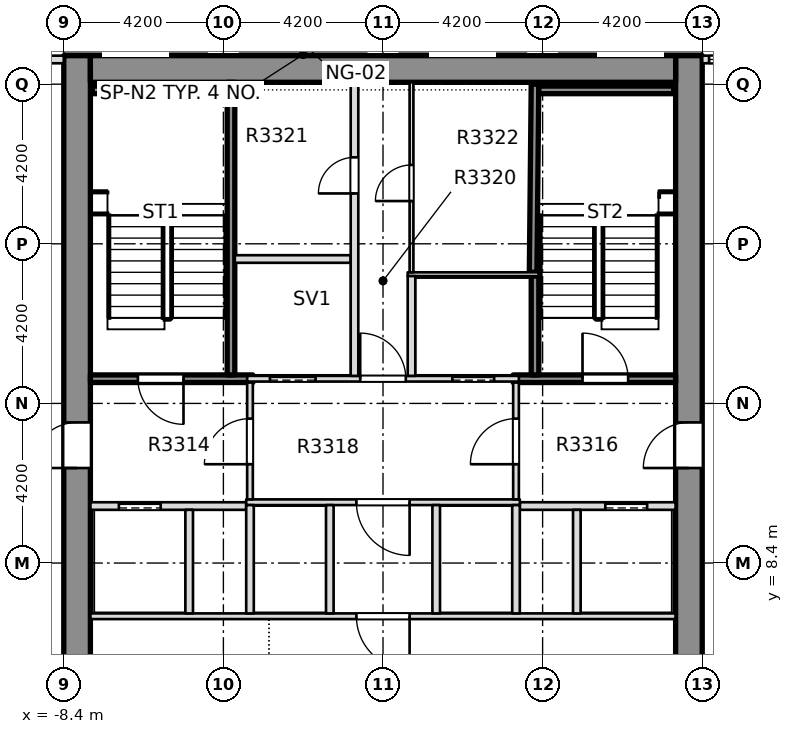
"""IFC4 building model, lengths in metres.
Left out: names, types, materials, properties, quantities, classifications, styles, units other than length and angle.
Written with IfcOpenShell. Run it as: python <this file> out.ifc"""

import sys

from ifc_helpers import new_model, si_unit, direction, frame, frame_2d, origin, place, context, subcontext, project, spatial, rectangle, extrude, element, fill, save


model = new_model("IFC4")
c1 = context("Model", 3, precision=1e-05, world=origin(), true_north=direction((0.0, 1.0)))
c2 = subcontext(c1, "Body", "Model", "MODEL_VIEW")
j1 = project(units=[si_unit("LENGTHUNIT", "METRE"), si_unit("PLANEANGLEUNIT", "RADIAN")], contexts=[c1])
p1 = place(None, origin())
s1 = spatial("IfcSite", under=j1, at=p1, CompositionType="ELEMENT")
p2 = place(p1, origin())
s2 = spatial("IfcBuilding", under=s1, at=p2, CompositionType="ELEMENT")
p3 = place(p2, frame((0.0, 0.0, 133.1)))
s3 = spatial("IfcBuildingStorey", under=s2, at=p3, CompositionType="ELEMENT", Elevation=133.1)
p4 = place(p3, frame((8.05, -8.4, -0.4), z_axis=(0.0, 0.0, 1.0), x_axis=(0.0, 1.0, 0.0)))
e1 = element("IfcWall", 1, at=p4, inside=s3, PredefinedType="SOLIDWALL", context=c2, shape_type="SweptSolid", body=[
    extrude(rectangle(XDim=30.15, YDim=0.7, at=frame_2d((15.075, 0.0))), origin(), (0.0, 0.0, 1.0), 3.45),
])
p5 = place(p4, frame((19.3, 0.0, 0.4)))
e2 = element("IfcOpeningElement", 2, at=p5, cuts=e1, PredefinedType="OPENING", context=c2, shape_type="SweptSolid", body=[
    extrude(rectangle(XDim=1.2, YDim=2.1, at=frame_2d((0.6, 1.05))), frame((0.0, 0.36, 0.0), z_axis=(0.0, -1.0, 0.0), x_axis=(1.0, 0.0, 0.0)), (0.0, 0.0, 1.0), 0.72),
])
p6 = place(p3, frame((-8.05, -8.4, -0.4), z_axis=(0.0, 0.0, 1.0), x_axis=(0.0, 1.0, 0.0)))
e3 = element("IfcWall", 3, at=p6, inside=s3, PredefinedType="SOLIDWALL", context=c2, shape_type="SweptSolid", body=[
    extrude(rectangle(XDim=30.15, YDim=0.7, at=frame_2d((15.075, 0.0))), origin(), (0.0, 0.0, 1.0), 3.45),
])
p7 = place(p6, frame((19.3, 0.0, 0.4)))
e4 = element("IfcOpeningElement", 4, at=p7, cuts=e3, PredefinedType="OPENING", context=c2, shape_type="SweptSolid", body=[
    extrude(rectangle(XDim=1.2, YDim=2.1, at=frame_2d((0.6, 1.05))), frame((0.0, 0.36, 0.0), z_axis=(0.0, -1.0, 0.0), x_axis=(1.0, 0.0, 0.0)), (0.0, 0.0, 1.0), 0.72),
])
p8 = place(p3, frame((-7.7, 21.4, -0.4), z_axis=(0.0, 0.0, 1.0), x_axis=(1.0, 0.0, 0.0)))
e5 = element("IfcWall", 5, at=p8, inside=s3, PredefinedType="SHEAR", context=c2, shape_type="SweptSolid", body=[
    extrude(rectangle(XDim=15.4, YDim=0.7, at=frame_2d((7.7, 0.0))), origin(), (0.0, 0.0, 1.0), 3.45),
])
p9 = place(p3, frame((12.05, 21.65, 0.0), z_axis=(0.0, 0.0, 1.0), x_axis=(-1.0, 0.0, 0.0)))
e6 = element("IfcWall", 6, at=p9, inside=s3, PredefinedType="STANDARD", context=c2, shape_type="SweptSolid", body=[
    extrude(rectangle(XDim=3.65, YDim=0.2, at=frame_2d((1.825, 0.0))), origin(), (0.0, 0.0, 1.0), 3.05),
])
p10 = place(p9, frame((1.67, 0.0, 0.2)))
e7 = element("IfcOpeningElement", 7, at=p10, cuts=e6, PredefinedType="OPENING", context=c2, shape_type="SweptSolid", body=[
    extrude(rectangle(XDim=1.8, YDim=2.65, at=frame_2d((0.9, 1.325))), frame((0.0, 0.11, 0.0), z_axis=(0.0, -1.0, 0.0), x_axis=(1.0, 0.0, 0.0)), (0.0, 0.0, 1.0), 0.22),
])
p11 = place(p3, frame((-8.4, 21.65, 0.0), z_axis=(0.0, 0.0, 1.0), x_axis=(-1.0, 0.0, 0.0)))
e8 = element("IfcWall", 8, at=p11, inside=s3, PredefinedType="STANDARD", context=c2, shape_type="SweptSolid", body=[
    extrude(rectangle(XDim=3.65, YDim=0.2, at=frame_2d((1.825, 0.0))), origin(), (0.0, 0.0, 1.0), 3.05),
])
p12 = place(p11, frame((0.375, 0.0, 0.2)))
e9 = element("IfcOpeningElement", 9, at=p12, cuts=e8, PredefinedType="OPENING", context=c2, shape_type="SweptSolid", body=[
    extrude(rectangle(XDim=1.8, YDim=2.65, at=frame_2d((0.9, 1.325))), frame((0.0, 0.11, 0.0), z_axis=(0.0, -1.0, 0.0), x_axis=(1.0, 0.0, 0.0)), (0.0, 0.0, 1.0), 0.22),
])
p13 = place(p3, frame((-7.699, 7.0, 0.0), z_axis=(0.0, 0.0, 1.0), x_axis=(1.0, 0.0, 0.0)))
e10 = element("IfcWall", 10, at=p13, inside=s3, PredefinedType="PARTITIONING", context=c2, shape_type="SweptSolid", body=[
    extrude(rectangle(XDim=15.398, YDim=0.15, at=frame_2d((7.699, 0.0))), origin(), (0.0, 0.0, 1.0), 3.05),
])
p14 = place(p13, frame((6.999, 0.0, 0.0)))
e11 = element("IfcOpeningElement", 11, at=p14, cuts=e10, PredefinedType="OPENING", context=c2, shape_type="SweptSolid", body=[
    extrude(rectangle(XDim=1.4, YDim=2.1, at=frame_2d((0.7, 1.05))), frame((0.0, 0.085, 0.0), z_axis=(0.0, -1.0, 0.0), x_axis=(1.0, 0.0, 0.0)), (0.0, 0.0, 1.0), 0.17),
])
p15 = place(p3, frame((-7.699, 9.9, 0.0), z_axis=(0.0, 0.0, 1.0), x_axis=(1.0, 0.0, 0.0)))
e12 = element("IfcWall", 12, at=p15, inside=s3, PredefinedType="PARTITIONING", context=c2, shape_type="SweptSolid", body=[
    extrude(rectangle(XDim=4.099, YDim=0.2, at=frame_2d((2.049, 0.0))), origin(), (0.0, 0.0, 1.0), 3.05),
])
p16 = place(p15, frame((0.749, 0.0, 0.0)))
e13 = element("IfcOpeningElement", 13, at=p16, cuts=e12, PredefinedType="OPENING", context=c2, shape_type="SweptSolid", body=[
    extrude(rectangle(XDim=1.1, YDim=2.1, at=frame_2d((0.55, 1.05))), frame((0.0, 0.11, 0.0), z_axis=(0.0, -1.0, 0.0), x_axis=(1.0, 0.0, 0.0)), (0.0, 0.0, 1.0), 0.22),
])
p17 = place(p3, frame((3.6, 9.9, 0.0), z_axis=(0.0, 0.0, 1.0), x_axis=(1.0, 0.0, 0.0)))
e14 = element("IfcWall", 14, at=p17, inside=s3, PredefinedType="PARTITIONING", context=c2, shape_type="SweptSolid", body=[
    extrude(rectangle(XDim=4.099, YDim=0.2, at=frame_2d((2.049, 0.0))), origin(), (0.0, 0.0, 1.0), 3.05),
])
p18 = place(p17, frame((2.25, 0.0, 0.0)))
e15 = element("IfcOpeningElement", 15, at=p18, cuts=e14, PredefinedType="OPENING", context=c2, shape_type="SweptSolid", body=[
    extrude(rectangle(XDim=1.1, YDim=2.1, at=frame_2d((0.55, 1.05))), frame((0.0, 0.11, 0.0), z_axis=(0.0, -1.0, 0.0), x_axis=(1.0, 0.0, 0.0)), (0.0, 0.0, 1.0), 0.22),
])
p19 = place(p3, frame((-3.6, 10.0, 0.0), z_axis=(0.0, 0.0, 1.0), x_axis=(1.0, 0.0, 0.0)))
e16 = element("IfcWall", 16, at=p19, inside=s3, PredefinedType="PARTITIONING", context=c2, shape_type="SweptSolid", body=[
    extrude(rectangle(XDim=7.2, YDim=0.15, at=frame_2d((3.6, 0.0))), origin(), (0.0, 0.0, 1.0), 3.05),
])
p20 = place(p19, frame((2.9, 0.0, 0.0)))
e17 = element("IfcOpeningElement", 17, at=p20, cuts=e16, PredefinedType="OPENING", context=c2, shape_type="SweptSolid", body=[
    extrude(rectangle(XDim=1.4, YDim=2.1, at=frame_2d((0.7, 1.05))), frame((0.0, 0.085, 0.0), z_axis=(0.0, -1.0, 0.0), x_axis=(1.0, 0.0, 0.0)), (0.0, 0.0, 1.0), 0.17),
])
p21 = place(p3, frame((-7.699, 13.25, 0.0), z_axis=(0.0, 0.0, 1.0), x_axis=(1.0, 0.0, 0.0)))
e18 = element("IfcWall", 18, at=p21, inside=s3, PredefinedType="SOLIDWALL", context=c2, shape_type="SweptSolid", body=[
    extrude(rectangle(XDim=4.274, YDim=0.2, at=frame_2d((2.137, 0.0))), origin(), (0.0, 0.0, 1.0), 3.05),
])
p22 = place(p21, frame((1.249, 0.0, 0.0)))
e19 = element("IfcOpeningElement", 19, at=p22, cuts=e18, PredefinedType="OPENING", context=c2, shape_type="SweptSolid", body=[
    extrude(rectangle(XDim=1.2, YDim=2.1, at=frame_2d((0.6, 1.05))), frame((0.0, 0.11, 0.0), z_axis=(0.0, -1.0, 0.0), x_axis=(1.0, 0.0, 0.0)), (0.0, 0.0, 1.0), 0.22),
])
p23 = place(p3, frame((-3.575, 13.25, 0.0), z_axis=(0.0, 0.0, 1.0), x_axis=(1.0, 0.0, 0.0)))
e20 = element("IfcWall", 20, at=p23, inside=s3, PredefinedType="PARTITIONING", context=c2, shape_type="SweptSolid", body=[
    extrude(rectangle(XDim=7.15, YDim=0.15, at=frame_2d((3.575, 0.0))), origin(), (0.0, 0.0, 1.0), 3.05),
])
p24 = place(p23, frame((0.6, 0.0, 0.0)))
e21 = element("IfcOpeningElement", 21, at=p24, cuts=e20, PredefinedType="OPENING", context=c2, shape_type="SweptSolid", body=[
    extrude(rectangle(XDim=1.2, YDim=2.1, at=frame_2d((0.6, 1.05))), frame((0.0, 0.085, 0.0), z_axis=(0.0, -1.0, 0.0), x_axis=(1.0, 0.0, 0.0)), (0.0, 0.0, 1.0), 0.17),
])
p25 = place(p23, frame((5.4, 0.0, 0.0)))
e22 = element("IfcOpeningElement", 22, at=p25, cuts=e20, PredefinedType="OPENING", context=c2, shape_type="SweptSolid", body=[
    extrude(rectangle(XDim=1.1, YDim=2.1, at=frame_2d((0.55, 1.05))), frame((0.0, 0.085, 0.0), z_axis=(0.0, -1.0, 0.0), x_axis=(1.0, 0.0, 0.0)), (0.0, 0.0, 1.0), 0.17),
])
p26 = place(p23, frame((2.975, 0.0, 0.0)))
e23 = element("IfcOpeningElement", 23, at=p26, cuts=e20, PredefinedType="OPENING", context=c2, shape_type="SweptSolid", body=[
    extrude(rectangle(XDim=1.2, YDim=2.1, at=frame_2d((0.6, 1.05))), frame((0.0, 0.085, 0.0), z_axis=(0.0, -1.0, 0.0), x_axis=(1.0, 0.0, 0.0)), (0.0, 0.0, 1.0), 0.17),
])
p27 = place(p3, frame((3.425, 13.25, 0.0), z_axis=(0.0, 0.0, 1.0), x_axis=(1.0, 0.0, 0.0)))
e24 = element("IfcWall", 24, at=p27, inside=s3, PredefinedType="SOLIDWALL", context=c2, shape_type="SweptSolid", body=[
    extrude(rectangle(XDim=4.274, YDim=0.2, at=frame_2d((2.137, 0.0))), origin(), (0.0, 0.0, 1.0), 3.05),
])
p28 = place(p27, frame((1.825, 0.0, 0.0)))
e25 = element("IfcOpeningElement", 25, at=p28, cuts=e24, PredefinedType="OPENING", context=c2, shape_type="SweptSolid", body=[
    extrude(rectangle(XDim=1.2, YDim=2.1, at=frame_2d((0.6, 1.05))), frame((0.0, 0.11, 0.0), z_axis=(0.0, -1.0, 0.0), x_axis=(1.0, 0.0, 0.0)), (0.0, 0.0, 1.0), 0.22),
])
p29 = place(p3, frame((0.65, 16.0, 0.0), z_axis=(0.0, 0.0, 1.0), x_axis=(1.0, 0.0, 0.0)))
e26 = element("IfcWall", 26, at=p29, inside=s3, PredefinedType="PARTITIONING", context=c2, shape_type="SweptSolid", body=[
    extrude(rectangle(XDim=3.45, YDim=0.1, at=frame_2d((1.725, 0.0))), origin(), (0.0, 0.0, 1.0), 3.05),
])
p30 = place(p3, frame((-3.9, 16.4, 0.0), z_axis=(0.0, 0.0, 1.0), x_axis=(1.0, 0.0, 0.0)))
e27 = element("IfcWall", 27, at=p30, inside=s3, PredefinedType="PARTITIONING", context=c2, shape_type="SweptSolid", body=[
    extrude(rectangle(XDim=3.05, YDim=0.2, at=frame_2d((1.525, 0.0))), origin(), (0.0, 0.0, 1.0), 3.05),
])
p31 = place(p3, frame((-5.1, 7.075, 0.0), z_axis=(0.0, 0.0, 1.0), x_axis=(0.0, 1.0, 0.0)))
e28 = element("IfcWall", 28, at=p31, inside=s3, PredefinedType="PARTITIONING", context=c2, shape_type="SweptSolid", body=[
    extrude(rectangle(XDim=2.725, YDim=0.2, at=frame_2d((1.363, 0.0))), origin(), (0.0, 0.0, 1.0), 3.05),
])
p32 = place(p3, frame((-4.0, 13.35, 0.0), z_axis=(0.0, 0.0, 1.0), x_axis=(0.0, 1.0, 0.0)))
e29 = element("IfcWall", 29, at=p32, inside=s3, PredefinedType="SOLIDWALL", context=c2, shape_type="SweptSolid", body=[
    extrude(rectangle(XDim=7.699, YDim=0.2, at=frame_2d((3.85, 0.0))), origin(), (0.0, 0.0, 1.0), 3.05),
])
p33 = place(p3, frame((-3.5, 7.075, 0.0), z_axis=(0.0, 0.0, 1.0), x_axis=(0.0, 1.0, 0.0)))
e30 = element("IfcWall", 30, at=p33, inside=s3, PredefinedType="PARTITIONING", context=c2, shape_type="SweptSolid", body=[
    extrude(rectangle(XDim=2.85, YDim=0.2, at=frame_2d((1.425, 0.0))), origin(), (0.0, 0.0, 1.0), 3.05),
])
p34 = place(p3, frame((-3.5, 10.075, 0.0), z_axis=(0.0, 0.0, 1.0), x_axis=(0.0, 1.0, 0.0)))
e31 = element("IfcWall", 31, at=p34, inside=s3, PredefinedType="PARTITIONING", context=c2, shape_type="SweptSolid", body=[
    extrude(rectangle(XDim=3.075, YDim=0.15, at=frame_2d((1.538, 0.0))), origin(), (0.0, 0.0, 1.0), 3.05),
])
p35 = place(p34, frame((0.925, 0.0, 0.0)))
e32 = element("IfcOpeningElement", 32, at=p35, cuts=e31, PredefinedType="OPENING", context=c2, shape_type="SweptSolid", body=[
    extrude(rectangle(XDim=1.2, YDim=2.1, at=frame_2d((0.6, 1.05))), frame((0.0, 0.085, 0.0), z_axis=(0.0, -1.0, 0.0), x_axis=(1.0, 0.0, 0.0)), (0.0, 0.0, 1.0), 0.17),
])
p36 = place(p3, frame((-1.4, 7.075, 0.0), z_axis=(0.0, 0.0, 1.0), x_axis=(0.0, 1.0, 0.0)))
e33 = element("IfcWall", 33, at=p36, inside=s3, PredefinedType="PARTITIONING", context=c2, shape_type="SweptSolid", body=[
    extrude(rectangle(XDim=2.85, YDim=0.2, at=frame_2d((1.425, 0.0))), origin(), (0.0, 0.0, 1.0), 3.05),
])
p37 = place(p3, frame((-0.75, 13.325, 0.0), z_axis=(0.0, 0.0, 1.0), x_axis=(0.0, 1.0, 0.0)))
e34 = element("IfcWall", 34, at=p37, inside=s3, PredefinedType="PARTITIONING", context=c2, shape_type="SweptSolid", body=[
    extrude(rectangle(XDim=7.724, YDim=0.2, at=frame_2d((3.862, 0.0))), origin(), (0.0, 0.0, 1.0), 3.05),
])
p38 = place(p37, frame((4.8, 0.0, 0.0)))
e35 = element("IfcOpeningElement", 35, at=p38, cuts=e34, PredefinedType="OPENING", context=c2, shape_type="SweptSolid", body=[
    extrude(rectangle(XDim=0.95, YDim=2.1, at=frame_2d((0.475, 1.05))), frame((0.0, 0.11, 0.0), z_axis=(0.0, -1.0, 0.0), x_axis=(1.0, 0.0, 0.0)), (0.0, 0.0, 1.0), 0.22),
])
p39 = place(p3, frame((0.75, 13.325, 0.0), z_axis=(0.0, 0.0, 1.0), x_axis=(0.0, 1.0, 0.0)))
e36 = element("IfcWall", 36, at=p39, inside=s3, PredefinedType="PARTITIONING", context=c2, shape_type="SweptSolid", body=[
    extrude(rectangle(XDim=2.625, YDim=0.2, at=frame_2d((1.312, 0.0))), origin(), (0.0, 0.0, 1.0), 3.05),
])
p40 = place(p3, frame((0.75, 16.05, 0.0), z_axis=(0.0, 0.0, 1.0), x_axis=(0.0, 1.0, 0.0)))
e37 = element("IfcWall", 37, at=p40, inside=s3, PredefinedType="PARTITIONING", context=c2, shape_type="SweptSolid", body=[
    extrude(rectangle(XDim=4.999, YDim=0.1, at=frame_2d((2.5, 0.0))), origin(), (0.0, 0.0, 1.0), 3.05),
])
p41 = place(p40, frame((1.875, 0.0, 0.0)))
e38 = element("IfcOpeningElement", 38, at=p41, cuts=e37, PredefinedType="OPENING", context=c2, shape_type="SweptSolid", body=[
    extrude(rectangle(XDim=0.95, YDim=2.1, at=frame_2d((0.475, 1.05))), frame((0.0, 0.06, 0.0), z_axis=(0.0, -1.0, 0.0), x_axis=(1.0, 0.0, 0.0)), (0.0, 0.0, 1.0), 0.12),
])
for number, where, z_axis, x_axis in (
    (39, (1.4, 7.075, 0.0), (0.0, 0.0, 1.0), (0.0, 1.0, 0.0)),
    (40, (3.5, 7.075, 0.0), (0.0, 0.0, 1.0), (0.0, 1.0, 0.0)),
):
    element("IfcWall", number, at=place(p3, frame(where, z_axis=z_axis, x_axis=x_axis)), inside=s3, PredefinedType="PARTITIONING", context=c2, shape_type="SweptSolid", body=[
        extrude(rectangle(XDim=2.85, YDim=0.2, at=frame_2d((1.425, 0.0))), origin(), (0.0, 0.0, 1.0), 3.05),
    ])
p42 = place(p3, frame((3.5, 10.075, 0.0), z_axis=(0.0, 0.0, 1.0), x_axis=(0.0, 1.0, 0.0)))
e41 = element("IfcWall", 41, at=p42, inside=s3, PredefinedType="PARTITIONING", context=c2, shape_type="SweptSolid", body=[
    extrude(rectangle(XDim=3.075, YDim=0.15, at=frame_2d((1.538, 0.0))), origin(), (0.0, 0.0, 1.0), 3.05),
])
p43 = place(p42, frame((0.925, 0.0, 0.0)))
e42 = element("IfcOpeningElement", 42, at=p43, cuts=e41, PredefinedType="OPENING", context=c2, shape_type="SweptSolid", body=[
    extrude(rectangle(XDim=1.2, YDim=2.1, at=frame_2d((0.6, 1.05))), frame((0.0, 0.085, 0.0), z_axis=(0.0, -1.0, 0.0), x_axis=(1.0, 0.0, 0.0)), (0.0, 0.0, 1.0), 0.17),
])
p44 = place(p3, frame((4.0, 13.35, 0.0), z_axis=(0.0, 0.0, 1.0), x_axis=(0.0, 1.0, 0.0)))
e43 = element("IfcWall", 43, at=p44, inside=s3, PredefinedType="SOLIDWALL", context=c2, shape_type="SweptSolid", body=[
    extrude(rectangle(XDim=2.6, YDim=0.2, at=frame_2d((1.3, 0.0))), origin(), (0.0, 0.0, 1.0), 3.05),
])
p45 = place(p3, frame((3.95, 16.05, 0.0), z_axis=(0.0, 0.0, 1.0), x_axis=(0.010112452169, 0.999948867848, 0.0)))
e44 = element("IfcWall", 44, at=p45, inside=s3, PredefinedType="SOLIDWALL", context=c2, shape_type="SweptSolid", body=[
    extrude(rectangle(XDim=4.949, YDim=0.2, at=frame_2d((2.475, 0.0))), origin(), (0.0, 0.0, 1.0), 3.05),
])
p46 = place(p3, frame((5.1, 7.075, 0.0), z_axis=(0.0, 0.0, 1.0), x_axis=(0.0, 1.0, 0.0)))
e45 = element("IfcWall", 45, at=p46, inside=s3, PredefinedType="PARTITIONING", context=c2, shape_type="SweptSolid", body=[
    extrude(rectangle(XDim=2.725, YDim=0.2, at=frame_2d((1.363, 0.0))), origin(), (0.0, 0.0, 1.0), 3.05),
])
p47 = place(p3, frame((-7.65, 20.85, 0.0), z_axis=(0.0, 0.0, 1.0), x_axis=(1.0, 0.0, 0.0)))
e46 = element("IfcWall", 46, at=p47, inside=s3, PredefinedType="SOLIDWALL", context=c2, shape_type="SweptSolid", body=[
    extrude(rectangle(XDim=3.5, YDim=0.2, at=frame_2d((1.75, 0.0))), origin(), (0.0, 0.0, 1.0), 3.05),
])
p48 = place(p3, frame((4.1, 20.85, 0.0), z_axis=(0.0, 0.0, 1.0), x_axis=(1.0, 0.0, 0.0)))
e47 = element("IfcWall", 47, at=p48, inside=s3, PredefinedType="SOLIDWALL", context=c2, shape_type="SweptSolid", body=[
    extrude(rectangle(XDim=3.55, YDim=0.2, at=frame_2d((1.775, 0.0))), origin(), (0.0, 0.0, 1.0), 3.05),
])
p49 = place(p10, origin())
e48 = element("IfcWindow", 48, at=p49, inside=s3, PartitioningType="SINGLE_PANEL", PredefinedType="WINDOW", context=c2, shape_type="SweptSolid", body=[
    extrude(rectangle(XDim=1.8, YDim=2.65, at=frame_2d((0.9, 1.325))), frame((0.0, 0.03, 0.0), z_axis=(0.0, -1.0, 0.0), x_axis=(1.0, 0.0, 0.0)), (0.0, 0.0, 1.0), 0.06),
])
fill(e7, e48)
p50 = place(p22, origin())
e49 = element("IfcDoor", 49, at=p50, inside=s3, OperationType="SINGLE_SWING_LEFT", PredefinedType="DOOR", context=c2, shape_type="SweptSolid", body=[
    extrude(rectangle(XDim=1.2, YDim=2.1, at=frame_2d((0.6, 1.05))), frame((0.0, 0.025, 0.0), z_axis=(0.0, -1.0, 0.0), x_axis=(1.0, 0.0, 0.0)), (0.0, 0.0, 1.0), 0.05),
])
fill(e19, e49)
p51 = place(p16, origin())
e50 = element("IfcDoor", 50, at=p51, inside=s3, OperationType="SLIDING_TO_RIGHT", PredefinedType="DOOR", context=c2, shape_type="SweptSolid", body=[
    extrude(rectangle(XDim=1.1, YDim=2.1, at=frame_2d((0.55, 1.05))), frame((0.0, 0.025, 0.0), z_axis=(0.0, -1.0, 0.0), x_axis=(1.0, 0.0, 0.0)), (0.0, 0.0, 1.0), 0.05),
])
fill(e13, e50)
p52 = place(p28, origin())
e51 = element("IfcDoor", 51, at=p52, inside=s3, OperationType="SINGLE_SWING_RIGHT", PredefinedType="DOOR", context=c2, shape_type="SweptSolid", body=[
    extrude(rectangle(XDim=1.2, YDim=2.1, at=frame_2d((0.6, 1.05))), frame((0.0, 0.025, 0.0), z_axis=(0.0, -1.0, 0.0), x_axis=(1.0, 0.0, 0.0)), (0.0, 0.0, 1.0), 0.05),
])
fill(e25, e51)
p53 = place(p18, origin())
e52 = element("IfcDoor", 52, at=p53, inside=s3, OperationType="SLIDING_TO_LEFT", PredefinedType="DOOR", context=c2, shape_type="SweptSolid", body=[
    extrude(rectangle(XDim=1.1, YDim=2.1, at=frame_2d((0.55, 1.05))), frame((0.0, 0.025, 0.0), z_axis=(0.0, -1.0, 0.0), x_axis=(1.0, 0.0, 0.0)), (0.0, 0.0, 1.0), 0.05),
])
fill(e15, e52)
p54 = place(p14, origin())
e53 = element("IfcDoor", 53, at=p54, inside=s3, OperationType="SINGLE_SWING_RIGHT", PredefinedType="DOOR", context=c2, shape_type="SweptSolid", body=[
    extrude(rectangle(XDim=1.4, YDim=2.1, at=frame_2d((0.7, 1.05))), frame((0.0, 0.025, 0.0), z_axis=(0.0, -1.0, 0.0), x_axis=(1.0, 0.0, 0.0)), (0.0, 0.0, 1.0), 0.05),
])
fill(e11, e53)
p55 = place(p20, origin())
e54 = element("IfcDoor", 54, at=p55, inside=s3, OperationType="SINGLE_SWING_RIGHT", PredefinedType="DOOR", context=c2, shape_type="SweptSolid", body=[
    extrude(rectangle(XDim=1.4, YDim=2.1, at=frame_2d((0.7, 1.05))), frame((0.0, 0.025, 0.0), z_axis=(0.0, -1.0, 0.0), x_axis=(1.0, 0.0, 0.0)), (0.0, 0.0, 1.0), 0.05),
])
fill(e17, e54)
p56 = place(p24, origin())
e55 = element("IfcDoor", 55, at=p56, inside=s3, OperationType="SLIDING_TO_RIGHT", PredefinedType="DOOR", context=c2, shape_type="SweptSolid", body=[
    extrude(rectangle(XDim=1.2, YDim=2.1, at=frame_2d((0.6, 1.05))), frame((0.0, 0.025, 0.0), z_axis=(0.0, -1.0, 0.0), x_axis=(1.0, 0.0, 0.0)), (0.0, 0.0, 1.0), 0.05),
])
fill(e21, e55)
p57 = place(p25, origin())
e56 = element("IfcDoor", 56, at=p57, inside=s3, OperationType="SLIDING_TO_LEFT", PredefinedType="DOOR", context=c2, shape_type="SweptSolid", body=[
    extrude(rectangle(XDim=1.1, YDim=2.1, at=frame_2d((0.55, 1.05))), frame((0.0, 0.025, 0.0), z_axis=(0.0, -1.0, 0.0), x_axis=(1.0, 0.0, 0.0)), (0.0, 0.0, 1.0), 0.05),
])
fill(e22, e56)
p58 = place(p26, origin())
e57 = element("IfcDoor", 57, at=p58, inside=s3, OperationType="SINGLE_SWING_RIGHT", PredefinedType="DOOR", context=c2, shape_type="SweptSolid", body=[
    extrude(rectangle(XDim=1.2, YDim=2.1, at=frame_2d((0.6, 1.05))), frame((0.0, 0.025, 0.0), z_axis=(0.0, -1.0, 0.0), x_axis=(1.0, 0.0, 0.0)), (0.0, 0.0, 1.0), 0.05),
])
fill(e23, e57)
p59 = place(p38, origin())
e58 = element("IfcDoor", 58, at=p59, inside=s3, OperationType="SINGLE_SWING_RIGHT", PredefinedType="DOOR", context=c2, shape_type="SweptSolid", body=[
    extrude(rectangle(XDim=0.95, YDim=2.1, at=frame_2d((0.475, 1.05))), frame((0.0, 0.025, 0.0), z_axis=(0.0, -1.0, 0.0), x_axis=(1.0, 0.0, 0.0)), (0.0, 0.0, 1.0), 0.05),
])
fill(e35, e58)
p60 = place(p41, origin())
e59 = element("IfcDoor", 59, at=p60, inside=s3, OperationType="SINGLE_SWING_LEFT", PredefinedType="DOOR", context=c2, shape_type="SweptSolid", body=[
    extrude(rectangle(XDim=0.95, YDim=2.1, at=frame_2d((0.475, 1.05))), frame((0.0, 0.025, 0.0), z_axis=(0.0, -1.0, 0.0), x_axis=(1.0, 0.0, 0.0)), (0.0, 0.0, 1.0), 0.05),
])
fill(e38, e59)
p61 = place(p35, origin())
e60 = element("IfcDoor", 60, at=p61, inside=s3, OperationType="SINGLE_SWING_RIGHT", PredefinedType="DOOR", context=c2, shape_type="SweptSolid", body=[
    extrude(rectangle(XDim=1.2, YDim=2.1, at=frame_2d((0.6, 1.05))), frame((0.0, 0.025, 0.0), z_axis=(0.0, -1.0, 0.0), x_axis=(1.0, 0.0, 0.0)), (0.0, 0.0, 1.0), 0.05),
])
fill(e32, e60)
p62 = place(p43, origin())
e61 = element("IfcDoor", 61, at=p62, inside=s3, OperationType="SINGLE_SWING_LEFT", PredefinedType="DOOR", context=c2, shape_type="SweptSolid", body=[
    extrude(rectangle(XDim=1.2, YDim=2.1, at=frame_2d((0.6, 1.05))), frame((0.0, 0.025, 0.0), z_axis=(0.0, -1.0, 0.0), x_axis=(1.0, 0.0, 0.0)), (0.0, 0.0, 1.0), 0.05),
])
fill(e42, e61)
p63 = place(p7, origin())
e62 = element("IfcDoor", 62, at=p63, inside=s3, OperationType="SINGLE_SWING_LEFT", PredefinedType="DOOR", context=c2, shape_type="SweptSolid", body=[
    extrude(rectangle(XDim=1.2, YDim=2.1, at=frame_2d((0.6, 1.05))), frame((0.0, 0.025, 0.0), z_axis=(0.0, -1.0, 0.0), x_axis=(1.0, 0.0, 0.0)), (0.0, 0.0, 1.0), 0.05),
])
fill(e4, e62)
p64 = place(p5, origin())
e63 = element("IfcDoor", 63, at=p64, inside=s3, OperationType="SINGLE_SWING_LEFT", PredefinedType="DOOR", context=c2, shape_type="SweptSolid", body=[
    extrude(rectangle(XDim=1.2, YDim=2.1, at=frame_2d((0.6, 1.05))), frame((0.0, 0.025, 0.0), z_axis=(0.0, -1.0, 0.0), x_axis=(1.0, 0.0, 0.0)), (0.0, 0.0, 1.0), 0.05),
])
fill(e2, e63)
save(model, sys.argv[1])
